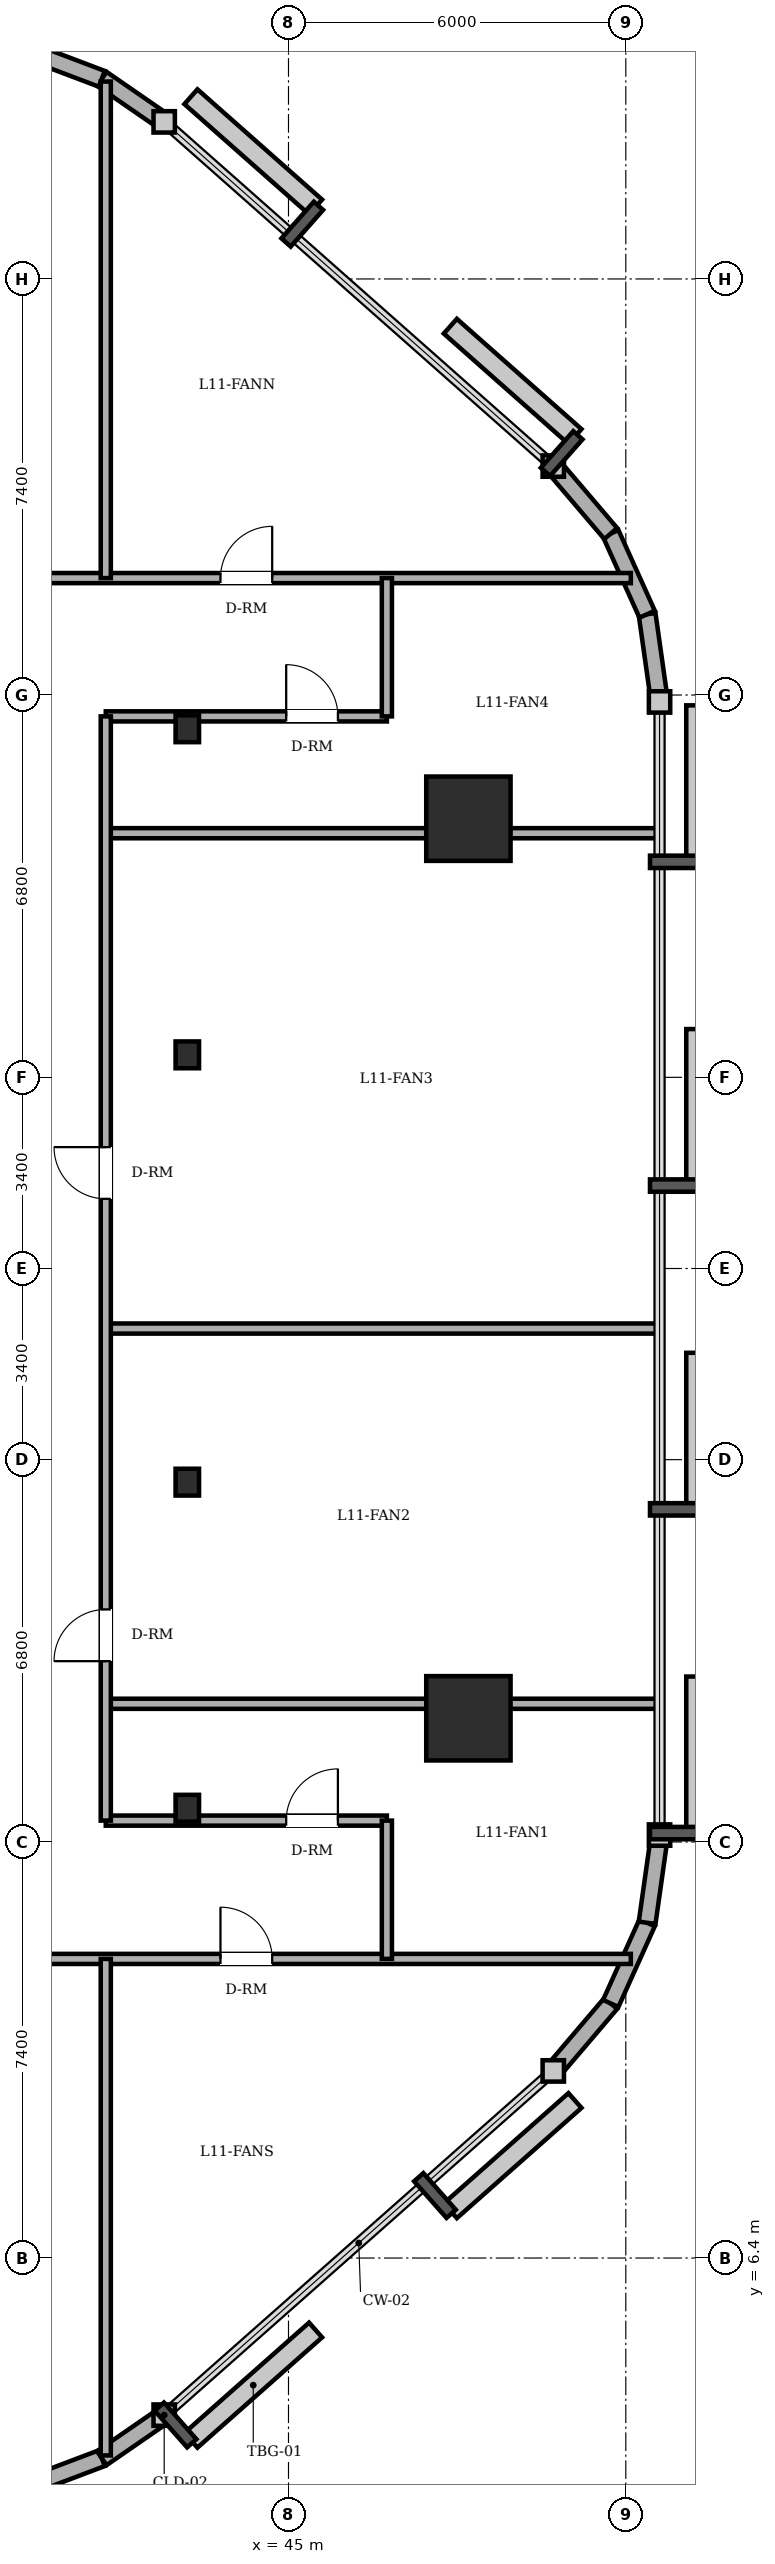
"""IFC4 building model, lengths in metres.
Left out: names, types, materials, properties, quantities, classifications, styles, units other than length and angle.
Written with IfcOpenShell. Run it as: python <this file> out.ifc"""

import sys

from ifc_helpers import new_model, si_unit, direction, frame, frame_2d, origin, origin_2d, place, context, subcontext, project, spatial, rectangle, circle, i_section, extrude, element, fill, save


model = new_model("IFC4")
c1 = context("Model", 3, precision=1e-05, world=origin(), true_north=direction((0.0, 1.0)))
c2 = subcontext(c1, "Body", "Model", "MODEL_VIEW")
j1 = project(units=[si_unit("LENGTHUNIT", "METRE"), si_unit("PLANEANGLEUNIT", "RADIAN")], contexts=[c1])
p1 = place(None, origin())
s1 = spatial("IfcSite", under=j1, at=p1, CompositionType="ELEMENT")
p2 = place(p1, origin())
s2 = spatial("IfcBuilding", under=s1, at=p2, CompositionType="ELEMENT")
p3 = place(p2, frame((0.0, 0.0, 43.2)))
s3 = spatial("IfcBuildingStorey", under=s2, at=p3, CompositionType="ELEMENT", Elevation=43.2)
for number, where, z_axis, x_axis in (
    (1, (48.2, 16.0, 0.0), (0.0, 0.0, 1.0), (1.0, 0.0, 0.0)),
    (2, (48.2, 32.0, 0.0), (0.0, 0.0, 1.0), (1.0, 0.0, 0.0)),
):
    element("IfcColumn", number, at=place(p3, frame(where, z_axis=z_axis, x_axis=x_axis)), inside=s3, PredefinedType="COLUMN", context=c2, shape_type="SweptSolid", body=[
        extrude(circle(Radius=0.75, at=origin_2d()), origin(), (0.0, 0.0, 1.0), 3.6),
    ])
for number, where, z_axis, x_axis in (
    (3, (43.2, 14.4, 0.0), (0.0, 0.0, 1.0), (1.0, 0.0, 0.0)),
    (4, (43.2, 20.2, 0.0), (0.0, 0.0, 1.0), (1.0, 0.0, 0.0)),
    (5, (43.2, 27.8, 0.0), (0.0, 0.0, 1.0), (1.0, 0.0, 0.0)),
    (6, (43.2, 33.6, 0.0), (0.0, 0.0, 1.0), (1.0, 0.0, 0.0)),
):
    element("IfcColumn", number, at=place(p3, frame(where, z_axis=z_axis, x_axis=x_axis)), inside=s3, PredefinedType="COLUMN", context=c2, shape_type="SweptSolid", body=[
        extrude(i_section(OverallWidth=0.417, OverallDepth=0.477, WebThickness=0.036, FlangeThickness=0.057, FilletRadius=0.015, at=origin_2d()), origin(), (0.0, 0.0, 1.0), 3.6),
    ])
p4 = place(p3, frame((40.417, 2.362, 0.0), z_axis=(0.0, 0.0, 1.0), x_axis=(0.935156721165, 0.354234254216, 0.0)))
e7 = element("IfcWall", 7, at=p4, inside=s3, PredefinedType="SOLIDWALL", context=c2, shape_type="SweptSolid", body=[
    extrude(rectangle(XDim=1.349, YDim=0.3, at=frame_2d((0.675, 0.0))), origin(), (0.0, 0.0, 1.0), 3.4),
])
p5 = place(p3, frame((41.679, 2.84, 0.0), z_axis=(0.0, 0.0, 1.0), x_axis=(0.823116500192, 0.567872544777, 0.0)))
e8 = element("IfcWall", 8, at=p5, inside=s3, PredefinedType="SOLIDWALL", context=c2, shape_type="SweptSolid", body=[
    extrude(rectangle(XDim=1.349, YDim=0.3, at=frame_2d((0.674, 0.0))), origin(), (0.0, 0.0, 1.0), 3.4),
])
p6 = place(p3, frame((49.71, 9.728, 0.0), z_axis=(0.0, 0.0, 1.0), x_axis=(0.648389989909, 0.7613083613, 0.0)))
e9 = element("IfcWall", 9, at=p6, inside=s3, PredefinedType="SOLIDWALL", context=c2, shape_type="SweptSolid", body=[
    extrude(rectangle(XDim=1.576, YDim=0.3, at=frame_2d((0.788, 0.0))), origin(), (0.0, 0.0, 1.0), 3.4),
])
p7 = place(p3, frame((50.732, 10.928, 0.0), z_axis=(0.0, 0.0, 1.0), x_axis=(0.410996558744, 0.911636895206, 0.0)))
e10 = element("IfcWall", 10, at=p7, inside=s3, PredefinedType="SOLIDWALL", context=c2, shape_type="SweptSolid", body=[
    extrude(rectangle(XDim=1.574, YDim=0.3, at=frame_2d((0.787, 0.0))), origin(), (0.0, 0.0, 1.0), 3.4),
])
for number, where, z_axis, x_axis in (
    (11, (51.379, 12.363, 0.0), (0.0, 0.0, 1.0), (0.14, 0.99, 0.0)),
    (12, (51.6, 34.077, 0.0), (0.0, 0.0, 1.0), (-0.14, 0.99, 0.0)),
):
    element("IfcWall", number, at=place(p3, frame(where, z_axis=z_axis, x_axis=x_axis)), inside=s3, PredefinedType="SOLIDWALL", context=c2, shape_type="SweptSolid", body=[
        extrude(rectangle(XDim=1.576, YDim=0.3, at=frame_2d((0.788, 0.0))), origin(), (0.0, 0.0, 1.0), 3.4),
    ])
p8 = place(p3, frame((51.379, 35.637, 0.0), z_axis=(0.0, 0.0, 1.0), x_axis=(-0.410996558744, 0.911636895206, 0.0)))
e13 = element("IfcWall", 13, at=p8, inside=s3, PredefinedType="SOLIDWALL", context=c2, shape_type="SweptSolid", body=[
    extrude(rectangle(XDim=1.574, YDim=0.3, at=frame_2d((0.787, 0.0))), origin(), (0.0, 0.0, 1.0), 3.4),
])
p9 = place(p3, frame((50.732, 37.072, 0.0), z_axis=(0.0, 0.0, 1.0), x_axis=(-0.648389989909, 0.7613083613, 0.0)))
e14 = element("IfcWall", 14, at=p9, inside=s3, PredefinedType="SOLIDWALL", context=c2, shape_type="SweptSolid", body=[
    extrude(rectangle(XDim=1.576, YDim=0.3, at=frame_2d((0.788, 0.0))), origin(), (0.0, 0.0, 1.0), 3.4),
])
p10 = place(p3, frame((42.789, 44.394, 0.0), z_axis=(0.0, 0.0, 1.0), x_axis=(-0.823116500192, 0.567872544777, 0.0)))
e15 = element("IfcWall", 15, at=p10, inside=s3, PredefinedType="SOLIDWALL", context=c2, shape_type="SweptSolid", body=[
    extrude(rectangle(XDim=1.349, YDim=0.3, at=frame_2d((0.674, 0.0))), origin(), (0.0, 0.0, 1.0), 3.4),
])
p11 = place(p3, frame((41.679, 45.16, 0.0), z_axis=(0.0, 0.0, 1.0), x_axis=(-0.935156721165, 0.354234254216, 0.0)))
e16 = element("IfcWall", 16, at=p11, inside=s3, PredefinedType="SOLIDWALL", context=c2, shape_type="SweptSolid", body=[
    extrude(rectangle(XDim=1.349, YDim=0.3, at=frame_2d((0.675, 0.0))), origin(), (0.0, 0.0, 1.0), 3.4),
])
p12 = place(p3, frame((3.4, 11.72, 0.0), z_axis=(0.0, 0.0, 1.0), x_axis=(1.0, 0.0, 0.0)))
e17 = element("IfcWall", 17, at=p12, inside=s3, PredefinedType="PARTITIONING", context=c2, shape_type="SweptSolid", body=[
    extrude(rectangle(XDim=47.689, YDim=0.18, at=frame_2d((23.845, 0.0))), origin(), (0.0, 0.0, 1.0), 3.4),
])
p13 = place(p12, frame((21.24, 0.0, 0.0)))
e18 = element("IfcOpeningElement", 18, at=p13, cuts=e17, PredefinedType="OPENING", context=c2, shape_type="SweptSolid", body=[
    extrude(rectangle(XDim=0.92, YDim=2.1, at=frame_2d((0.46, 1.05))), frame((0.0, 0.1, 0.0), z_axis=(0.0, -1.0, 0.0), x_axis=(1.0, 0.0, 0.0)), (0.0, 0.0, 1.0), 0.2),
])
p14 = place(p12, frame((40.39, 0.0, 0.0)))
e19 = element("IfcOpeningElement", 19, at=p14, cuts=e17, PredefinedType="OPENING", context=c2, shape_type="SweptSolid", body=[
    extrude(rectangle(XDim=0.92, YDim=2.1, at=frame_2d((0.46, 1.05))), frame((0.0, 0.1, 0.0), z_axis=(0.0, -1.0, 0.0), x_axis=(1.0, 0.0, 0.0)), (0.0, 0.0, 1.0), 0.2),
])
p15 = place(p12, frame((10.74, 0.0, 0.0)))
e20 = element("IfcOpeningElement", 20, at=p15, cuts=e17, PredefinedType="OPENING", context=c2, shape_type="SweptSolid", body=[
    extrude(rectangle(XDim=0.92, YDim=2.1, at=frame_2d((0.46, 1.05))), frame((0.0, 0.1, 0.0), z_axis=(0.0, -1.0, 0.0), x_axis=(1.0, 0.0, 0.0)), (0.0, 0.0, 1.0), 0.2),
])
p16 = place(p12, frame((30.515, 0.0, 0.0)))
e21 = element("IfcOpeningElement", 21, at=p16, cuts=e17, PredefinedType="OPENING", context=c2, shape_type="SweptSolid", body=[
    extrude(rectangle(XDim=0.92, YDim=2.1, at=frame_2d((0.46, 1.05))), frame((0.0, 0.1, 0.0), z_axis=(0.0, -1.0, 0.0), x_axis=(1.0, 0.0, 0.0)), (0.0, 0.0, 1.0), 0.2),
])
p17 = place(p3, frame((41.75, 14.18, 0.0), z_axis=(0.0, 0.0, 1.0), x_axis=(1.0, 0.0, 0.0)))
e22 = element("IfcWall", 22, at=p17, inside=s3, PredefinedType="PARTITIONING", context=c2, shape_type="SweptSolid", body=[
    extrude(rectangle(XDim=5.0, YDim=0.18, at=frame_2d((2.5, 0.0))), origin(), (0.0, 0.0, 1.0), 2.782),
])
p18 = place(p17, frame((3.209, 0.0, 0.0)))
e23 = element("IfcOpeningElement", 23, at=p18, cuts=e22, PredefinedType="OPENING", context=c2, shape_type="SweptSolid", body=[
    extrude(rectangle(XDim=0.92, YDim=2.1, at=frame_2d((0.46, 1.05))), frame((0.0, 0.1, 0.0), z_axis=(0.0, -1.0, 0.0), x_axis=(1.0, 0.0, 0.0)), (0.0, 0.0, 1.0), 0.2),
])
for number, where, z_axis, x_axis in (
    (24, (41.75, 16.258, 0.0), (0.0, 0.0, 1.0), (1.0, 0.0, 0.0)),
    (25, (41.75, 22.932, 0.0), (0.0, 0.0, 1.0), (1.0, 0.0, 0.0)),
    (26, (41.75, 31.742, 0.0), (0.0, 0.0, 1.0), (1.0, 0.0, 0.0)),
):
    element("IfcWall", number, at=place(p3, frame(where, z_axis=z_axis, x_axis=x_axis)), inside=s3, PredefinedType="PARTITIONING", context=c2, shape_type="SweptSolid", body=[
        extrude(rectangle(XDim=9.85, YDim=0.18, at=frame_2d((4.925, 0.0))), origin(), (0.0, 0.0, 1.0), 3.4),
    ])
p19 = place(p3, frame((41.75, 33.82, 0.0), z_axis=(0.0, 0.0, 1.0), x_axis=(1.0, 0.0, 0.0)))
e27 = element("IfcWall", 27, at=p19, inside=s3, PredefinedType="PARTITIONING", context=c2, shape_type="SweptSolid", body=[
    extrude(rectangle(XDim=5.0, YDim=0.18, at=frame_2d((2.5, 0.0))), origin(), (0.0, 0.0, 1.0), 2.782),
])
p20 = place(p19, frame((3.209, 0.0, 0.0)))
e28 = element("IfcOpeningElement", 28, at=p20, cuts=e27, PredefinedType="OPENING", context=c2, shape_type="SweptSolid", body=[
    extrude(rectangle(XDim=0.92, YDim=2.1, at=frame_2d((0.46, 1.05))), frame((0.0, 0.1, 0.0), z_axis=(0.0, -1.0, 0.0), x_axis=(1.0, 0.0, 0.0)), (0.0, 0.0, 1.0), 0.2),
])
p21 = place(p3, frame((3.4, 36.28, 0.0), z_axis=(0.0, 0.0, 1.0), x_axis=(1.0, 0.0, 0.0)))
e29 = element("IfcWall", 29, at=p21, inside=s3, PredefinedType="PARTITIONING", context=c2, shape_type="SweptSolid", body=[
    extrude(rectangle(XDim=47.689, YDim=0.18, at=frame_2d((23.845, 0.0))), origin(), (0.0, 0.0, 1.0), 3.4),
])
p22 = place(p21, frame((21.05, 0.0, 0.0)))
e30 = element("IfcOpeningElement", 30, at=p22, cuts=e29, PredefinedType="OPENING", context=c2, shape_type="SweptSolid", body=[
    extrude(rectangle(XDim=0.9, YDim=2.1, at=frame_2d((0.45, 1.05))), frame((0.0, 0.1, 0.0), z_axis=(0.0, -1.0, 0.0), x_axis=(1.0, 0.0, 0.0)), (0.0, 0.0, 1.0), 0.2),
])
p23 = place(p21, frame((24.67, 0.0, 0.0)))
e31 = element("IfcOpeningElement", 31, at=p23, cuts=e29, PredefinedType="OPENING", context=c2, shape_type="SweptSolid", body=[
    extrude(rectangle(XDim=0.86, YDim=2.1, at=frame_2d((0.43, 1.05))), frame((0.0, 0.1, 0.0), z_axis=(0.0, -1.0, 0.0), x_axis=(1.0, 0.0, 0.0)), (0.0, 0.0, 1.0), 0.2),
])
p24 = place(p21, frame((40.39, 0.0, 0.0)))
e32 = element("IfcOpeningElement", 32, at=p24, cuts=e29, PredefinedType="OPENING", context=c2, shape_type="SweptSolid", body=[
    extrude(rectangle(XDim=0.92, YDim=2.1, at=frame_2d((0.46, 1.05))), frame((0.0, 0.1, 0.0), z_axis=(0.0, -1.0, 0.0), x_axis=(1.0, 0.0, 0.0)), (0.0, 0.0, 1.0), 0.2),
])
p25 = place(p21, frame((4.699, 0.0, 0.0)))
e33 = element("IfcOpeningElement", 33, at=p25, cuts=e29, PredefinedType="OPENING", context=c2, shape_type="SweptSolid", body=[
    extrude(rectangle(XDim=0.92, YDim=2.1, at=frame_2d((0.46, 1.05))), frame((0.0, 0.1, 0.0), z_axis=(0.0, -1.0, 0.0), x_axis=(1.0, 0.0, 0.0)), (0.0, 0.0, 1.0), 0.2),
])
p26 = place(p21, frame((13.298, 0.0, 0.0)))
e34 = element("IfcOpeningElement", 34, at=p26, cuts=e29, PredefinedType="OPENING", context=c2, shape_type="SweptSolid", body=[
    extrude(rectangle(XDim=0.92, YDim=2.1, at=frame_2d((0.46, 1.05))), frame((0.0, 0.1, 0.0), z_axis=(0.0, -1.0, 0.0), x_axis=(1.0, 0.0, 0.0)), (0.0, 0.0, 1.0), 0.2),
])
p27 = place(p21, frame((32.215, 0.0, 0.0)))
e35 = element("IfcOpeningElement", 35, at=p27, cuts=e29, PredefinedType="OPENING", context=c2, shape_type="SweptSolid", body=[
    extrude(rectangle(XDim=0.92, YDim=2.1, at=frame_2d((0.46, 1.05))), frame((0.0, 0.1, 0.0), z_axis=(0.0, -1.0, 0.0), x_axis=(1.0, 0.0, 0.0)), (0.0, 0.0, 1.0), 0.2),
])
p28 = place(p3, frame((41.75, 2.889, 0.0), z_axis=(0.0, 0.0, 1.0), x_axis=(0.0, 1.0, 0.0)))
e36 = element("IfcWall", 36, at=p28, inside=s3, PredefinedType="PARTITIONING", context=c2, shape_type="SweptSolid", body=[
    extrude(rectangle(XDim=8.831, YDim=0.18, at=frame_2d((4.416, 0.0))), origin(), (0.0, 0.0, 1.0), 2.782),
])
p29 = place(p3, frame((41.75, 14.18, 0.0), z_axis=(0.0, 0.0, 1.0), x_axis=(0.0, 1.0, 0.0)))
e37 = element("IfcWall", 37, at=p29, inside=s3, PredefinedType="PARTITIONING", context=c2, shape_type="SweptSolid", body=[
    extrude(rectangle(XDim=19.64, YDim=0.18, at=frame_2d((9.82, 0.0))), origin(), (0.0, 0.0, 1.0), 3.4),
])
p30 = place(p29, frame((2.836, 0.0, 0.0)))
e38 = element("IfcOpeningElement", 38, at=p30, cuts=e37, PredefinedType="OPENING", context=c2, shape_type="SweptSolid", body=[
    extrude(rectangle(XDim=0.92, YDim=2.1, at=frame_2d((0.46, 1.05))), frame((0.0, 0.1, 0.0), z_axis=(0.0, -1.0, 0.0), x_axis=(1.0, 0.0, 0.0)), (0.0, 0.0, 1.0), 0.2),
])
p31 = place(p29, frame((11.059, 0.0, 0.0)))
e39 = element("IfcOpeningElement", 39, at=p31, cuts=e37, PredefinedType="OPENING", context=c2, shape_type="SweptSolid", body=[
    extrude(rectangle(XDim=0.92, YDim=2.1, at=frame_2d((0.46, 1.05))), frame((0.0, 0.1, 0.0), z_axis=(0.0, -1.0, 0.0), x_axis=(1.0, 0.0, 0.0)), (0.0, 0.0, 1.0), 0.2),
])
p32 = place(p3, frame((41.75, 36.28, 0.0), z_axis=(0.0, 0.0, 1.0), x_axis=(0.0, 1.0, 0.0)))
e40 = element("IfcWall", 40, at=p32, inside=s3, PredefinedType="PARTITIONING", context=c2, shape_type="SweptSolid", body=[
    extrude(rectangle(XDim=8.831, YDim=0.18, at=frame_2d((4.416, 0.0))), origin(), (0.0, 0.0, 1.0), 2.782),
])
for number, where, z_axis, x_axis in (
    (41, (46.75, 11.72, 0.0), (0.0, 0.0, 1.0), (0.0, 1.0, 0.0)),
    (42, (46.75, 33.82, 0.0), (0.0, 0.0, 1.0), (0.0, 1.0, 0.0)),
):
    element("IfcWall", number, at=place(p3, frame(where, z_axis=z_axis, x_axis=x_axis)), inside=s3, PredefinedType="PARTITIONING", context=c2, shape_type="SweptSolid", body=[
        extrude(rectangle(XDim=2.46, YDim=0.18, at=frame_2d((1.23, 0.0))), origin(), (0.0, 0.0, 1.0), 3.4),
    ])
p33 = place(p18, origin())
e43 = element("IfcDoor", 43, at=p33, inside=s3, OperationType="SINGLE_SWING_RIGHT", PredefinedType="DOOR", context=c2, shape_type="SweptSolid", body=[
    extrude(rectangle(XDim=0.92, YDim=2.1, at=frame_2d((0.46, 1.05))), frame((0.0, 0.025, 0.0), z_axis=(0.0, -1.0, 0.0), x_axis=(1.0, 0.0, 0.0)), (0.0, 0.0, 1.0), 0.05),
])
fill(e23, e43)
p34 = place(p30, origin())
e44 = element("IfcDoor", 44, at=p34, inside=s3, OperationType="SINGLE_SWING_LEFT", PredefinedType="DOOR", context=c2, shape_type="SweptSolid", body=[
    extrude(rectangle(XDim=0.92, YDim=2.1, at=frame_2d((0.46, 1.05))), frame((0.0, 0.025, 0.0), z_axis=(0.0, -1.0, 0.0), x_axis=(1.0, 0.0, 0.0)), (0.0, 0.0, 1.0), 0.05),
])
fill(e38, e44)
p35 = place(p31, origin())
e45 = element("IfcDoor", 45, at=p35, inside=s3, OperationType="SINGLE_SWING_RIGHT", PredefinedType="DOOR", context=c2, shape_type="SweptSolid", body=[
    extrude(rectangle(XDim=0.92, YDim=2.1, at=frame_2d((0.46, 1.05))), frame((0.0, 0.025, 0.0), z_axis=(0.0, -1.0, 0.0), x_axis=(1.0, 0.0, 0.0)), (0.0, 0.0, 1.0), 0.05),
])
fill(e39, e45)
p36 = place(p20, origin())
e46 = element("IfcDoor", 46, at=p36, inside=s3, OperationType="SINGLE_SWING_LEFT", PredefinedType="DOOR", context=c2, shape_type="SweptSolid", body=[
    extrude(rectangle(XDim=0.92, YDim=2.1, at=frame_2d((0.46, 1.05))), frame((0.0, 0.025, 0.0), z_axis=(0.0, -1.0, 0.0), x_axis=(1.0, 0.0, 0.0)), (0.0, 0.0, 1.0), 0.05),
])
fill(e28, e46)
p37 = place(p24, origin())
e47 = element("IfcDoor", 47, at=p37, inside=s3, OperationType="SINGLE_SWING_RIGHT", PredefinedType="DOOR", context=c2, shape_type="SweptSolid", body=[
    extrude(rectangle(XDim=0.92, YDim=2.1, at=frame_2d((0.46, 1.05))), frame((0.0, 0.025, 0.0), z_axis=(0.0, -1.0, 0.0), x_axis=(1.0, 0.0, 0.0)), (0.0, 0.0, 1.0), 0.05),
])
fill(e32, e47)
p38 = place(p14, origin())
e48 = element("IfcDoor", 48, at=p38, inside=s3, OperationType="SINGLE_SWING_LEFT", PredefinedType="DOOR", context=c2, shape_type="SweptSolid", body=[
    extrude(rectangle(XDim=0.92, YDim=2.1, at=frame_2d((0.46, 1.05))), frame((0.0, 0.025, 0.0), z_axis=(0.0, -1.0, 0.0), x_axis=(1.0, 0.0, 0.0)), (0.0, 0.0, 1.0), 0.05),
])
fill(e19, e48)
save(model, sys.argv[1])
